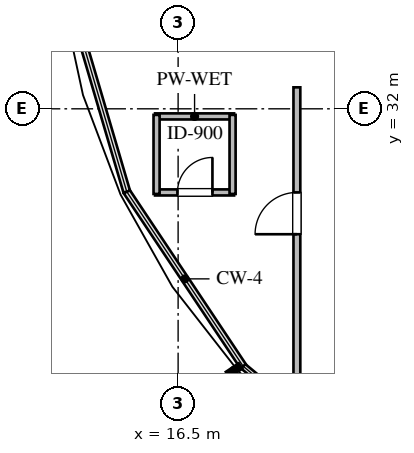
"""IFC4 building model, lengths in metres.
Left out: names, types, materials, properties, quantities, classifications, styles, units other than length and angle.
Written with IfcOpenShell. Run it as: python <this file> out.ifc"""

import sys

from ifc_helpers import new_model, si_unit, direction, frame, frame_2d, origin, place, context, subcontext, project, spatial, rectangle, extrude, element, fill, save


model = new_model("IFC4")
c1 = context("Model", 3, precision=1e-05, world=origin(), true_north=direction((0.0, 1.0)))
c2 = subcontext(c1, "Body", "Model", "MODEL_VIEW")
j1 = project(units=[si_unit("LENGTHUNIT", "METRE"), si_unit("PLANEANGLEUNIT", "RADIAN")], contexts=[c1])
p1 = place(None, origin())
s1 = spatial("IfcSite", under=j1, at=p1, CompositionType="ELEMENT")
p2 = place(p1, origin())
s2 = spatial("IfcBuilding", under=s1, at=p2, CompositionType="ELEMENT")
p3 = place(p2, frame((0.0, 0.0, 228.0)))
s3 = spatial("IfcBuildingStorey", under=s2, at=p3, CompositionType="ELEMENT", Elevation=228.0)
p4 = place(p3, frame((15.893, 29.8, 0.0), z_axis=(0.0, 0.0, 1.0), x_axis=(1.0, 0.0, 0.0)))
e1 = element("IfcWall", 1, at=p4, inside=s3, PredefinedType="PLUMBINGWALL", context=c2, shape_type="SweptSolid", body=[
    extrude(rectangle(XDim=2.08, YDim=0.16, at=frame_2d((1.04, 0.0))), origin(), (0.0, 0.0, 1.0), 3.36),
])
p5 = place(p4, frame((0.59, 0.0, 0.0)))
e2 = element("IfcOpeningElement", 2, at=p5, cuts=e1, PredefinedType="OPENING", context=c2, shape_type="SweptSolid", body=[
    extrude(rectangle(XDim=0.92, YDim=2.1, at=frame_2d((0.46, 1.05))), frame((0.0, 0.09, 0.0), z_axis=(0.0, -1.0, 0.0), x_axis=(1.0, 0.0, 0.0)), (0.0, 0.0, 1.0), 0.18),
])
p6 = place(p3, frame((15.893, 31.8, 0.0), z_axis=(0.0, 0.0, 1.0), x_axis=(1.0, 0.0, 0.0)))
e3 = element("IfcWall", 3, at=p6, inside=s3, PredefinedType="PLUMBINGWALL", context=c2, shape_type="SweptSolid", body=[
    extrude(rectangle(XDim=2.08, YDim=0.16, at=frame_2d((1.04, 0.0))), origin(), (0.0, 0.0, 1.0), 3.36),
])
p7 = place(p3, frame((15.933, 29.76, 0.0), z_axis=(0.0, 0.0, 1.0), x_axis=(0.0, 1.0, 0.0)))
e4 = element("IfcWall", 4, at=p7, inside=s3, PredefinedType="PLUMBINGWALL", context=c2, shape_type="SweptSolid", body=[
    extrude(rectangle(XDim=2.08, YDim=0.16, at=frame_2d((1.04, 0.0))), origin(), (0.0, 0.0, 1.0), 3.36),
])
p8 = place(p3, frame((17.933, 29.76, 0.0), z_axis=(0.0, 0.0, 1.0), x_axis=(0.0, 1.0, 0.0)))
e5 = element("IfcWall", 5, at=p8, inside=s3, PredefinedType="PLUMBINGWALL", context=c2, shape_type="SweptSolid", body=[
    extrude(rectangle(XDim=2.08, YDim=0.16, at=frame_2d((1.04, 0.0))), origin(), (0.0, 0.0, 1.0), 2.817),
])
p9 = place(p3, frame((19.625, 24.06, 0.0), z_axis=(0.0, 0.0, 1.0), x_axis=(0.0, 1.0, 0.0)))
e6 = element("IfcWall", 6, at=p9, inside=s3, PredefinedType="PARTITIONING", context=c2, shape_type="SweptSolid", body=[
    extrude(rectangle(XDim=8.505, YDim=0.18, at=frame_2d((4.252, 0.0))), origin(), (0.0, 0.0, 1.0), 2.817),
])
p10 = place(p9, frame((4.64, 0.0, 0.0)))
e7 = element("IfcOpeningElement", 7, at=p10, cuts=e6, PredefinedType="OPENING", context=c2, shape_type="SweptSolid", body=[
    extrude(rectangle(XDim=1.1, YDim=2.1, at=frame_2d((0.55, 1.05))), frame((0.0, 0.1, 0.0), z_axis=(0.0, -1.0, 0.0), x_axis=(1.0, 0.0, 0.0)), (0.0, 0.0, 1.0), 0.2),
])
p11 = place(p5, origin())
e8 = element("IfcDoor", 8, at=p11, inside=s3, OperationType="SINGLE_SWING_RIGHT", PredefinedType="DOOR", context=c2, shape_type="SweptSolid", body=[
    extrude(rectangle(XDim=0.92, YDim=2.1, at=frame_2d((0.46, 1.05))), frame((0.0, 0.025, 0.0), z_axis=(0.0, -1.0, 0.0), x_axis=(1.0, 0.0, 0.0)), (0.0, 0.0, 1.0), 0.05),
])
fill(e2, e8)
p12 = place(p10, origin())
e9 = element("IfcDoor", 9, at=p12, inside=s3, OperationType="SINGLE_SWING_LEFT", PredefinedType="DOOR", context=c2, shape_type="SweptSolid", body=[
    extrude(rectangle(XDim=1.1, YDim=2.1, at=frame_2d((0.55, 1.05))), frame((0.0, 0.025, 0.0), z_axis=(0.0, -1.0, 0.0), x_axis=(1.0, 0.0, 0.0)), (0.0, 0.0, 1.0), 0.05),
])
fill(e7, e9)
save(model, sys.argv[1])
